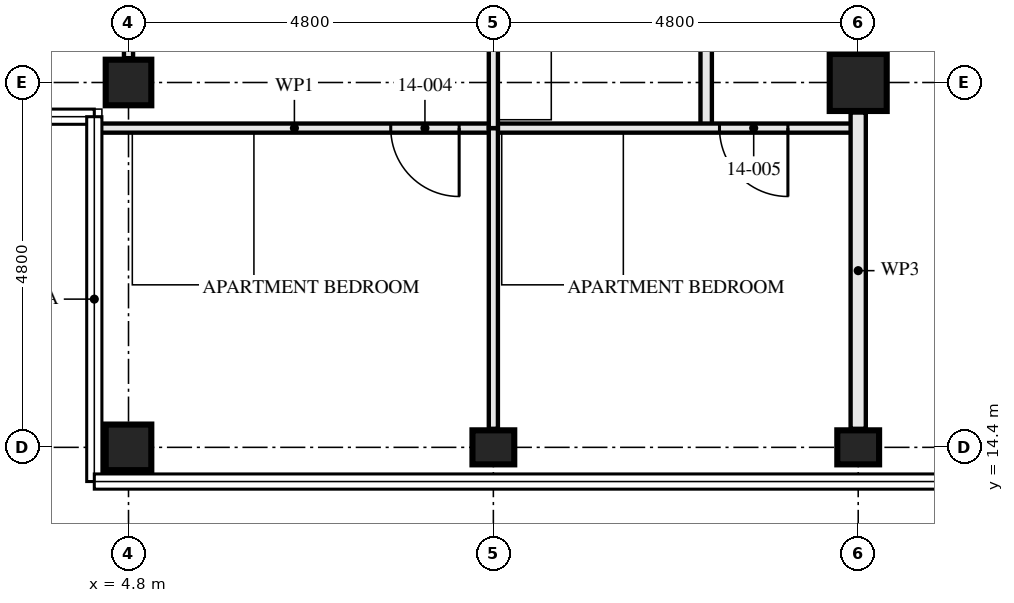
"""IFC4 building model, lengths in metres.
Left out: names, types, materials, properties, quantities, classifications, styles, units other than length and angle.
Written with IfcOpenShell. Run it as: python <this file> out.ifc"""

import sys

from ifc_helpers import new_model, si_unit, direction, frame, frame_2d, origin, origin_2d, place, context, subcontext, project, spatial, rectangle, hollow_rectangle, i_section, extrude, element, fill, save


model = new_model("IFC4")
c1 = context("Model", 3, precision=1e-05, world=origin(), true_north=direction((0.0, 1.0)))
c2 = subcontext(c1, "Body", "Model", "MODEL_VIEW")
j1 = project(units=[si_unit("LENGTHUNIT", "METRE"), si_unit("PLANEANGLEUNIT", "RADIAN")], contexts=[c1])
p1 = place(None, origin())
s1 = spatial("IfcSite", under=j1, at=p1, CompositionType="ELEMENT")
p2 = place(p1, origin())
s2 = spatial("IfcBuilding", under=s1, at=p2, CompositionType="ELEMENT")
p3 = place(p2, frame((0.0, 0.0, 55.0)))
s3 = spatial("IfcBuildingStorey", under=s2, at=p3, CompositionType="ELEMENT", Elevation=55.0)
for number, where, z_axis, x_axis in (
    (1, (4.8, 14.4, 0.0), (0.0, 0.0, 1.0), (0.0, 1.0, 0.0)),
    (2, (4.8, 19.2, 0.0), (0.0, 0.0, 1.0), (0.0, 1.0, 0.0)),
):
    element("IfcColumn", number, at=place(p3, frame(where, z_axis=z_axis, x_axis=x_axis)), inside=s3, PredefinedType="COLUMN", context=c2, shape_type="SweptSolid", body=[
        extrude(hollow_rectangle(XDim=0.6, YDim=0.6, WallThickness=0.05, at=origin_2d()), origin(), (0.0, 0.0, 1.0), 3.5),
    ])
for number, where, z_axis, x_axis in (
    (3, (9.6, 14.4, 0.0), (0.0, 0.0, 1.0), (0.0, 1.0, 0.0)),
    (4, (14.4, 14.4, 0.0), (0.0, 0.0, 1.0), (0.0, 1.0, 0.0)),
):
    element("IfcColumn", number, at=place(p3, frame(where, z_axis=z_axis, x_axis=x_axis)), inside=s3, PredefinedType="COLUMN", context=c2, shape_type="SweptSolid", body=[
        extrude(i_section(OverallWidth=0.448, OverallDepth=0.55, WebThickness=0.072, FlangeThickness=0.115, FilletRadius=0.015, at=origin_2d()), origin(), (0.0, 0.0, 1.0), 3.5),
    ])
p4 = place(p3, frame((14.4, 19.2, 0.0), z_axis=(0.0, 0.0, 1.0), x_axis=(1.0, 0.0, 0.0)))
e5 = element("IfcColumn", 5, at=p4, inside=s3, PredefinedType="COLUMN", context=c2, shape_type="SweptSolid", body=[
    extrude(hollow_rectangle(XDim=0.75, YDim=0.75, WallThickness=0.08, at=origin_2d()), origin(), (0.0, 0.0, 1.0), 3.5),
])
p5 = place(p3, frame((12.4, 18.6, 0.0), z_axis=(0.0, 0.0, 1.0), x_axis=(0.0, 1.0, 0.0)))
e6 = element("IfcWall", 6, at=p5, inside=s3, PredefinedType="PARTITIONING", context=c2, shape_type="SweptSolid", body=[
    extrude(rectangle(XDim=3.0, YDim=0.15, at=frame_2d((1.5, 0.0))), origin(), (0.0, 0.0, 1.0), 2.55),
])
p6 = place(p5, frame((1.05, 0.0, 0.0)))
e7 = element("IfcOpeningElement", 7, at=p6, cuts=e6, PredefinedType="OPENING", context=c2, shape_type="SweptSolid", body=[
    extrude(rectangle(XDim=0.9, YDim=2.1, at=frame_2d((0.45, 1.05))), frame((0.0, 0.085, 0.0), z_axis=(0.0, -1.0, 0.0), x_axis=(1.0, 0.0, 0.0)), (0.0, 0.0, 1.0), 0.171),
])
p7 = place(p3, frame((9.6, 18.6, 0.0), z_axis=(0.0, 0.0, 1.0), x_axis=(0.0, 1.0, 0.0)))
e8 = element("IfcWall", 8, at=p7, inside=s3, PredefinedType="PARTITIONING", context=c2, shape_type="SweptSolid", body=[
    extrude(rectangle(XDim=8.25, YDim=0.12, at=frame_2d((4.125, 0.0))), origin(), (0.0, 0.0, 1.0), 2.55),
])
p8 = place(p7, frame((5.15, 0.0, 0.0)))
e9 = element("IfcOpeningElement", 9, at=p8, cuts=e8, PredefinedType="OPENING", context=c2, shape_type="SweptSolid", body=[
    extrude(rectangle(XDim=0.9, YDim=2.1, at=frame_2d((0.45, 1.05))), frame((0.0, 0.071, 0.0), z_axis=(0.0, -1.0, 0.0), x_axis=(1.0, 0.0, 0.0)), (0.0, 0.0, 1.0), 0.141),
])
p9 = place(p3, frame((4.365, 18.6, 0.0), z_axis=(0.0, 0.0, 1.0), x_axis=(1.0, 0.0, 0.0)))
e10 = element("IfcWall", 10, at=p9, inside=s3, PredefinedType="PARTITIONING", context=c2, shape_type="SweptSolid", body=[
    extrude(rectangle(XDim=5.235, YDim=0.12, at=frame_2d((2.618, 0.0))), origin(), (0.0, 0.0, 1.0), 2.32),
])
p10 = place(p9, frame((3.885, 0.0, 0.0)))
e11 = element("IfcOpeningElement", 11, at=p10, cuts=e10, PredefinedType="OPENING", context=c2, shape_type="SweptSolid", body=[
    extrude(rectangle(XDim=0.9, YDim=2.1, at=frame_2d((0.45, 1.05))), frame((0.0, 0.071, 0.0), z_axis=(0.0, -1.0, 0.0), x_axis=(1.0, 0.0, 0.0)), (0.0, 0.0, 1.0), 0.141),
])
p11 = place(p3, frame((9.6, 18.6, 0.0), z_axis=(0.0, 0.0, 1.0), x_axis=(1.0, 0.0, 0.0)))
e12 = element("IfcWall", 12, at=p11, inside=s3, PredefinedType="PARTITIONING", context=c2, shape_type="SweptSolid", body=[
    extrude(rectangle(XDim=4.8, YDim=0.12, at=frame_2d((2.4, 0.0))), origin(), (0.0, 0.0, 1.0), 3.33),
])
p12 = place(p11, frame((2.975, 0.0, 0.0)))
e13 = element("IfcOpeningElement", 13, at=p12, cuts=e12, PredefinedType="OPENING", context=c2, shape_type="SweptSolid", body=[
    extrude(rectangle(XDim=0.9, YDim=2.1, at=frame_2d((0.45, 1.05))), frame((0.0, 0.071, 0.0), z_axis=(0.0, -1.0, 0.0), x_axis=(1.0, 0.0, 0.0)), (0.0, 0.0, 1.0), 0.141),
])
p13 = place(p3, frame((4.8, 19.52, 0.0), z_axis=(0.0, 0.0, 1.0), x_axis=(0.0, 1.0, 0.0)))
e14 = element("IfcWall", 14, at=p13, inside=s3, PredefinedType="PARTITIONING", context=c2, shape_type="SweptSolid", body=[
    extrude(rectangle(XDim=4.28, YDim=0.12, at=frame_2d((2.14, 0.0))), origin(), (0.0, 0.0, 1.0), 3.33),
])
p14 = place(p13, frame((1.53, 0.0, 0.0)))
e15 = element("IfcOpeningElement", 15, at=p14, cuts=e14, PredefinedType="OPENING", context=c2, shape_type="SweptSolid", body=[
    extrude(rectangle(XDim=0.9, YDim=2.1, at=frame_2d((0.45, 1.05))), frame((0.0, 0.071, 0.0), z_axis=(0.0, -1.0, 0.0), x_axis=(1.0, 0.0, 0.0)), (0.0, 0.0, 1.0), 0.141),
])
p15 = place(p3, frame((9.6, 14.644, 0.0), z_axis=(0.0, 0.0, 1.0), x_axis=(0.0, 1.0, 0.0)))
e16 = element("IfcWall", 16, at=p15, inside=s3, PredefinedType="PARTITIONING", context=c2, shape_type="SweptSolid", body=[
    extrude(rectangle(XDim=3.956, YDim=0.12, at=frame_2d((1.978, 0.0))), origin(), (0.0, 0.0, 1.0), 3.33),
])
p16 = place(p3, frame((14.4, 14.644, 0.0), z_axis=(0.0, 0.0, 1.0), x_axis=(0.0, 1.0, 0.0)))
e17 = element("IfcWall", 17, at=p16, inside=s3, PredefinedType="PARTITIONING", context=c2, shape_type="SweptSolid", body=[
    extrude(rectangle(XDim=4.161, YDim=0.2, at=frame_2d((2.081, 0.0))), origin(), (0.0, 0.0, 1.0), 2.32),
])
p17 = place(p3, frame((14.4, 19.595, 0.0), z_axis=(0.0, 0.0, 1.0), x_axis=(0.0, 1.0, 0.0)))
e18 = element("IfcWall", 18, at=p17, inside=s3, PredefinedType="PARTITIONING", context=c2, shape_type="SweptSolid", body=[
    extrude(rectangle(XDim=4.01, YDim=0.2, at=frame_2d((2.005, 0.0))), origin(), (0.0, 0.0, 1.0), 2.32),
])
p18 = place(p10, frame((0.9, 0.0, 0.0), z_axis=(0.0, 0.0, 1.0), x_axis=(-1.0, 0.0, 0.0)))
e19 = element("IfcDoor", 19, at=p18, inside=s3, OperationType="SINGLE_SWING_RIGHT", PredefinedType="DOOR", context=c2, shape_type="SweptSolid", body=[
    extrude(rectangle(XDim=0.9, YDim=2.1, at=frame_2d((0.45, 1.05))), frame((0.0, 0.022, 0.0), z_axis=(0.0, -1.0, 0.0), x_axis=(1.0, 0.0, 0.0)), (0.0, 0.0, 1.0), 0.044),
])
fill(e11, e19)
p19 = place(p12, frame((0.9, 0.0, 0.0), z_axis=(0.0, 0.0, 1.0), x_axis=(-1.0, 0.0, 0.0)))
e20 = element("IfcDoor", 20, at=p19, inside=s3, OperationType="SINGLE_SWING_RIGHT", PredefinedType="DOOR", context=c2, shape_type="SweptSolid", body=[
    extrude(rectangle(XDim=0.9, YDim=2.1, at=frame_2d((0.45, 1.05))), frame((0.0, 0.022, 0.0), z_axis=(0.0, -1.0, 0.0), x_axis=(1.0, 0.0, 0.0)), (0.0, 0.0, 1.0), 0.044),
])
fill(e13, e20)
save(model, sys.argv[1])
